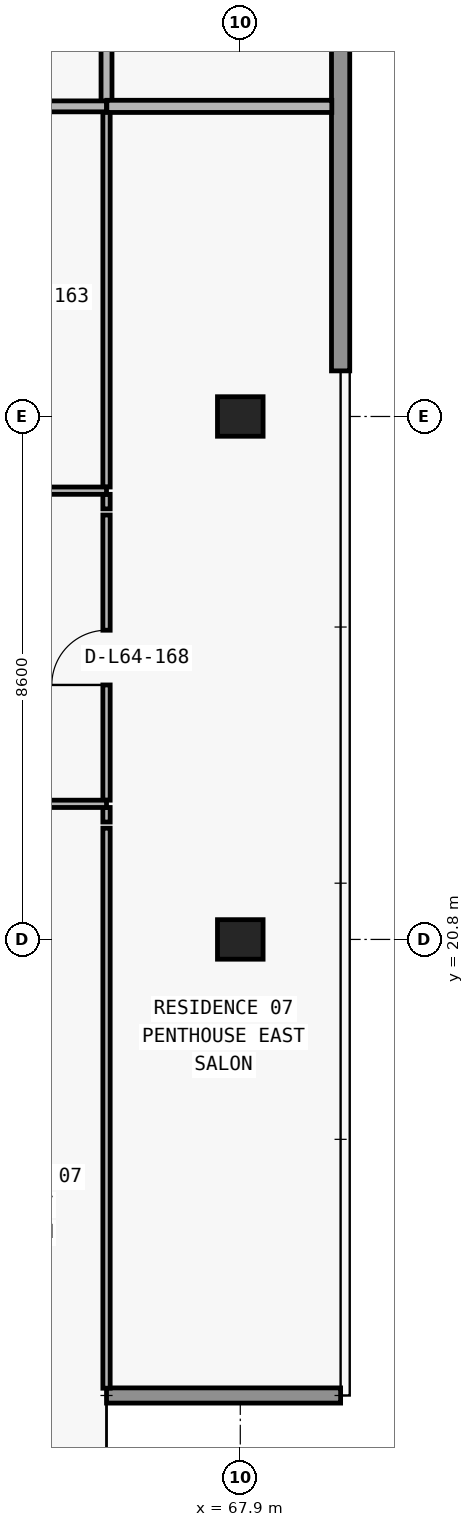
"""IFC4 building model, lengths in metres.
Left out: names, types, materials, properties, quantities, classifications, styles, units other than length and angle.
Written with IfcOpenShell. Run it as: python <this file> out.ifc"""

import sys

from ifc_helpers import new_model, si_unit, direction, frame, frame_2d, origin, origin_2d, place, context, subcontext, project, spatial, rectangle, extrude, element, fill, save


model = new_model("IFC4")
c1 = context("Model", 3, precision=1e-05, world=origin(), true_north=direction((0.0, 1.0)))
c2 = subcontext(c1, "Body", "Model", "MODEL_VIEW")
j1 = project(units=[si_unit("LENGTHUNIT", "METRE"), si_unit("PLANEANGLEUNIT", "RADIAN")], contexts=[c1])
p1 = place(None, origin())
s1 = spatial("IfcSite", under=j1, at=p1, CompositionType="ELEMENT")
p2 = place(p1, origin())
s2 = spatial("IfcBuilding", under=s1, at=p2, CompositionType="ELEMENT")
p3 = place(p2, frame((0.0, 0.0, 229.8)))
s3 = spatial("IfcBuildingStorey", under=s2, at=p3, CompositionType="ELEMENT", Elevation=229.8)
for number, where, z_axis, x_axis in (
    (1, (67.9, 20.8, 0.0), (0.0, 0.0, 1.0), (1.0, 0.0, 0.0)),
    (2, (67.9, 29.4, 0.0), (0.0, 0.0, 1.0), (1.0, 0.0, 0.0)),
):
    element("IfcColumn", number, at=place(p3, frame(where, z_axis=z_axis, x_axis=x_axis)), inside=s3, PredefinedType="COLUMN", context=c2, shape_type="SweptSolid", body=[
        extrude(rectangle(XDim=0.75, YDim=0.65, at=origin_2d()), origin(), (0.0, 0.0, 1.0), 3.05),
    ])
p4 = place(p3, frame((65.7, 13.3, 0.0), z_axis=(0.0, 0.0, 1.0), x_axis=(1.0, 0.0, 0.0)))
e3 = element("IfcWall", 3, at=p4, inside=s3, PredefinedType="ELEMENTEDWALL", context=c2, shape_type="SweptSolid", body=[
    extrude(rectangle(XDim=3.85, YDim=0.25, at=frame_2d((1.925, 0.0))), origin(), (0.0, 0.0, 1.0), 3.05),
])
p5 = place(p3, frame((69.55, 47.0, 0.0), z_axis=(0.0, 0.0, 1.0), x_axis=(0.0, -1.0, 0.0)))
e4 = element("IfcWall", 4, at=p5, inside=s3, PredefinedType="STANDARD", context=c2, shape_type="SweptSolid", body=[
    extrude(rectangle(XDim=16.85, YDim=0.3, at=frame_2d((8.425, 0.0))), origin(), (0.0, 0.0, 1.0), 3.05),
])
p6 = place(p3, frame((65.7, 13.42, 0.0), z_axis=(0.0, 0.0, 1.0), x_axis=(0.0, 1.0, 0.0)))
e5 = element("IfcWall", 5, at=p6, inside=s3, PredefinedType="PARTITIONING", context=c2, shape_type="SweptSolid", body=[
    extrude(rectangle(XDim=9.21, YDim=0.12, at=frame_2d((4.605, 0.0))), origin(), (0.0, 0.0, 1.0), 3.05),
])
p7 = place(p3, frame((65.7, 22.73, 0.0), z_axis=(0.0, 0.0, 1.0), x_axis=(0.0, 1.0, 0.0)))
e6 = element("IfcWall", 6, at=p7, inside=s3, PredefinedType="PARTITIONING", context=c2, shape_type="SweptSolid", body=[
    extrude(rectangle(XDim=0.24, YDim=0.12, at=frame_2d((0.12, 0.0))), origin(), (0.0, 0.0, 1.0), 3.05),
])
p8 = place(p3, frame((65.7, 23.09, 0.0), z_axis=(0.0, 0.0, 1.0), x_axis=(0.0, 1.0, 0.0)))
e7 = element("IfcWall", 7, at=p8, inside=s3, PredefinedType="PARTITIONING", context=c2, shape_type="SweptSolid", body=[
    extrude(rectangle(XDim=4.69, YDim=0.12, at=frame_2d((2.345, 0.0))), origin(), (0.0, 0.0, 1.0), 3.05),
])
p9 = place(p8, frame((1.895, 0.0, 0.0)))
e8 = element("IfcOpeningElement", 8, at=p9, cuts=e7, PredefinedType="OPENING", context=c2, shape_type="SweptSolid", body=[
    extrude(rectangle(XDim=0.9, YDim=2.15, at=frame_2d((0.45, 1.075))), frame((0.0, 0.07, 0.0), z_axis=(0.0, -1.0, 0.0), x_axis=(1.0, 0.0, 0.0)), (0.0, 0.0, 1.0), 0.14),
])
p10 = place(p3, frame((65.7, 27.88, 0.0), z_axis=(0.0, 0.0, 1.0), x_axis=(0.0, 1.0, 0.0)))
e9 = element("IfcWall", 9, at=p10, inside=s3, PredefinedType="PARTITIONING", context=c2, shape_type="SweptSolid", body=[
    extrude(rectangle(XDim=0.24, YDim=0.12, at=frame_2d((0.12, 0.0))), origin(), (0.0, 0.0, 1.0), 3.05),
])
p11 = place(p3, frame((65.7, 28.24, 0.0), z_axis=(0.0, 0.0, 1.0), x_axis=(0.0, 1.0, 0.0)))
e10 = element("IfcWall", 10, at=p11, inside=s3, PredefinedType="PARTITIONING", context=c2, shape_type="SweptSolid", body=[
    extrude(rectangle(XDim=6.26, YDim=0.12, at=frame_2d((3.13, 0.0))), origin(), (0.0, 0.0, 1.0), 3.05),
])
p12 = place(p3, frame((65.7, 34.505, 0.0), z_axis=(0.0, 0.0, 1.0), x_axis=(0.0, 1.0, 0.0)))
e11 = element("IfcWall", 11, at=p12, inside=s3, PredefinedType="PARTITIONING", context=c2, shape_type="SweptSolid", body=[
    extrude(rectangle(XDim=2.495, YDim=0.18, at=frame_2d((1.248, 0.0))), origin(), (0.0, 0.0, 1.0), 3.05),
])
p13 = place(p3, frame((59.5, 23.03, 0.0), z_axis=(0.0, 0.0, 1.0), x_axis=(1.0, 0.0, 0.0)))
e12 = element("IfcWall", 12, at=p13, inside=s3, PredefinedType="PARTITIONING", context=c2, shape_type="SweptSolid", body=[
    extrude(rectangle(XDim=6.2, YDim=0.12, at=frame_2d((3.1, 0.0))), origin(), (0.0, 0.0, 1.0), 3.05),
])
p14 = place(p13, frame((1.1, 0.0, 0.0)))
e13 = element("IfcOpeningElement", 13, at=p14, cuts=e12, PredefinedType="OPENING", context=c2, shape_type="SweptSolid", body=[
    extrude(rectangle(XDim=0.9, YDim=2.15, at=frame_2d((0.45, 1.075))), frame((0.0, 0.07, 0.0), z_axis=(0.0, -1.0, 0.0), x_axis=(1.0, 0.0, 0.0)), (0.0, 0.0, 1.0), 0.14),
])
p15 = place(p13, frame((4.2, 0.0, 0.0)))
e14 = element("IfcOpeningElement", 14, at=p15, cuts=e12, PredefinedType="OPENING", context=c2, shape_type="SweptSolid", body=[
    extrude(rectangle(XDim=0.9, YDim=2.15, at=frame_2d((0.45, 1.075))), frame((0.0, 0.07, 0.0), z_axis=(0.0, -1.0, 0.0), x_axis=(1.0, 0.0, 0.0)), (0.0, 0.0, 1.0), 0.14),
])
p16 = place(p3, frame((59.5, 28.18, 0.0), z_axis=(0.0, 0.0, 1.0), x_axis=(1.0, 0.0, 0.0)))
e15 = element("IfcWall", 15, at=p16, inside=s3, PredefinedType="PARTITIONING", context=c2, shape_type="SweptSolid", body=[
    extrude(rectangle(XDim=6.2, YDim=0.12, at=frame_2d((3.1, 0.0))), origin(), (0.0, 0.0, 1.0), 3.05),
])
p17 = place(p16, frame((1.825, 0.0, 0.0)))
e16 = element("IfcOpeningElement", 16, at=p17, cuts=e15, PredefinedType="OPENING", context=c2, shape_type="SweptSolid", body=[
    extrude(rectangle(XDim=0.9, YDim=2.15, at=frame_2d((0.45, 1.075))), frame((0.0, 0.07, 0.0), z_axis=(0.0, -1.0, 0.0), x_axis=(1.0, 0.0, 0.0)), (0.0, 0.0, 1.0), 0.14),
])
p18 = place(p3, frame((39.28, 34.5, 0.0), z_axis=(0.0, 0.0, 1.0), x_axis=(1.0, 0.0, 0.0)))
e17 = element("IfcWall", 17, at=p18, inside=s3, PredefinedType="PARTITIONING", context=c2, shape_type="SweptSolid", body=[
    extrude(rectangle(XDim=26.42, YDim=0.18, at=frame_2d((13.21, 0.0))), origin(), (0.0, 0.0, 1.0), 3.05),
])
p19 = place(p18, frame((6.295, 0.0, 0.0)))
e18 = element("IfcOpeningElement", 18, at=p19, cuts=e17, PredefinedType="OPENING", context=c2, shape_type="SweptSolid", body=[
    extrude(rectangle(XDim=1.0, YDim=2.2, at=frame_2d((0.5, 1.1))), frame((0.0, 0.1, 0.0), z_axis=(0.0, -1.0, 0.0), x_axis=(1.0, 0.0, 0.0)), (0.0, 0.0, 1.0), 0.2),
])
p20 = place(p18, frame((14.695, 0.0, 0.0)))
e19 = element("IfcOpeningElement", 19, at=p20, cuts=e17, PredefinedType="OPENING", context=c2, shape_type="SweptSolid", body=[
    extrude(rectangle(XDim=1.0, YDim=2.2, at=frame_2d((0.5, 1.1))), frame((0.0, 0.1, 0.0), z_axis=(0.0, -1.0, 0.0), x_axis=(1.0, 0.0, 0.0)), (0.0, 0.0, 1.0), 0.2),
])
p21 = place(p18, frame((21.995, 0.0, 0.0)))
e20 = element("IfcOpeningElement", 20, at=p21, cuts=e17, PredefinedType="OPENING", context=c2, shape_type="SweptSolid", body=[
    extrude(rectangle(XDim=1.0, YDim=2.2, at=frame_2d((0.5, 1.1))), frame((0.0, 0.1, 0.0), z_axis=(0.0, -1.0, 0.0), x_axis=(1.0, 0.0, 0.0)), (0.0, 0.0, 1.0), 0.2),
])
p22 = place(p3, frame((65.705, 34.5, 0.0), z_axis=(0.0, 0.0, 1.0), x_axis=(1.0, 0.0, 0.0)))
e21 = element("IfcWall", 21, at=p22, inside=s3, PredefinedType="PARTITIONING", context=c2, shape_type="SweptSolid", body=[
    extrude(rectangle(XDim=3.7, YDim=0.2, at=frame_2d((1.85, 0.0))), origin(), (0.0, 0.0, 1.0), 3.05),
])
p23 = place(p9, origin())
e22 = element("IfcDoor", 22, at=p23, inside=s3, OperationType="SINGLE_SWING_LEFT", PredefinedType="DOOR", context=c2, shape_type="SweptSolid", body=[
    extrude(rectangle(XDim=0.9, YDim=2.15, at=frame_2d((0.45, 1.075))), frame((0.0, 0.025, 0.0), z_axis=(0.0, -1.0, 0.0), x_axis=(1.0, 0.0, 0.0)), (0.0, 0.0, 1.0), 0.05),
])
fill(e8, e22)
save(model, sys.argv[1])
